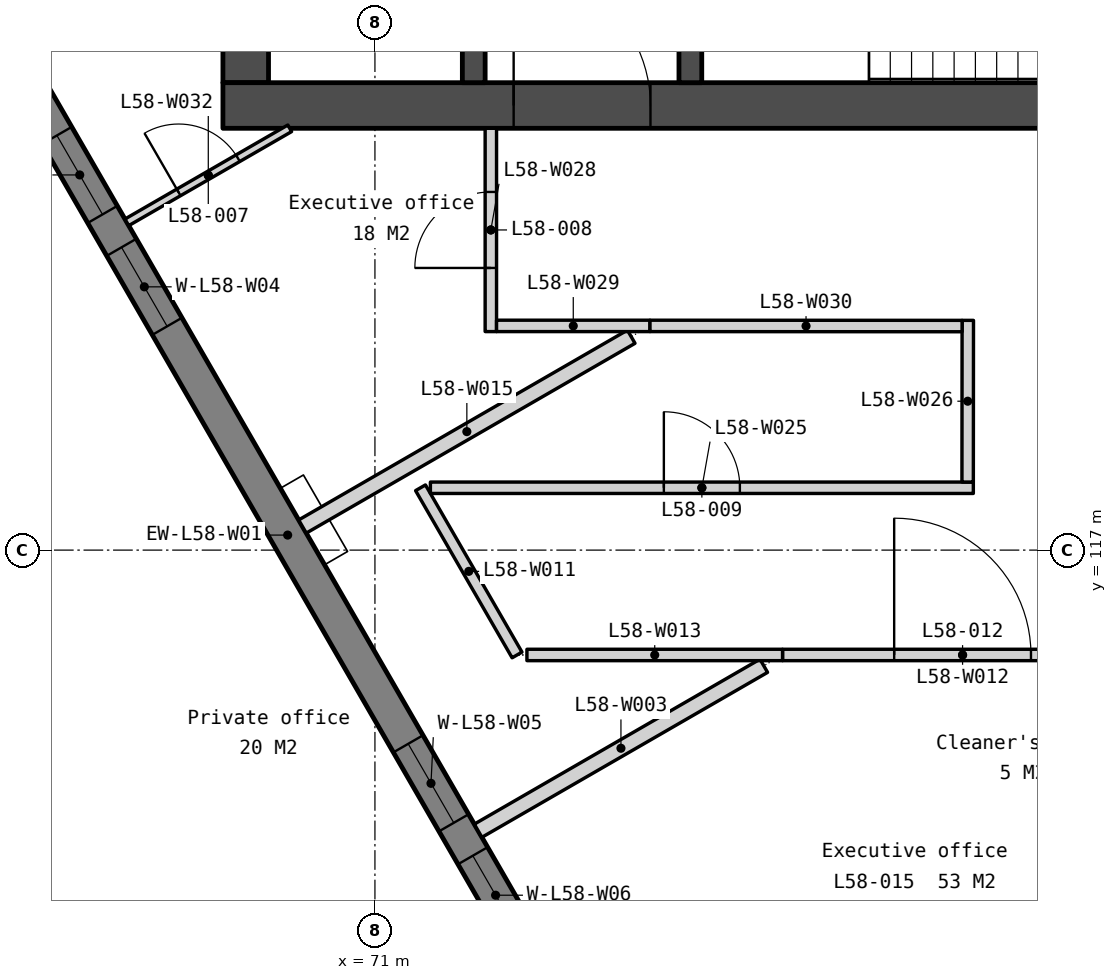
"""IFC4 building model, lengths in metres.
Left out: names, types, materials, properties, quantities, classifications, styles, units other than length and angle.
Written with IfcOpenShell. Run it as: python <this file> out.ifc"""

import sys

from ifc_helpers import new_model, si_unit, direction, frame, frame_2d, origin, place, context, subcontext, project, spatial, polyline, rectangle, outline, extrude, element, fill, save


model = new_model("IFC4")
c1 = context("Model", 3, precision=1e-05, world=origin(), true_north=direction((0.0, 1.0)))
c2 = subcontext(c1, "Body", "Model", "MODEL_VIEW")
j1 = project(units=[si_unit("LENGTHUNIT", "METRE"), si_unit("PLANEANGLEUNIT", "RADIAN")], contexts=[c1])
p1 = place(None, origin())
s1 = spatial("IfcSite", under=j1, at=p1, CompositionType="ELEMENT")
p2 = place(p1, origin())
s2 = spatial("IfcBuilding", under=s1, at=p2, CompositionType="ELEMENT")
p3 = place(p2, frame((0.0, 0.0, 238.7)))
s3 = spatial("IfcBuildingStorey", under=s2, at=p3, CompositionType="ELEMENT", Elevation=238.7)
p4 = place(p3, frame((69.3, 133.95, 0.0), z_axis=(0.0, 0.0, 1.0), x_axis=(0.0, -1.0, 0.0)))
e1 = element("IfcWall", 1, at=p4, inside=s3, PredefinedType="SOLIDWALL", context=c2, shape_type="SweptSolid", body=[
    extrude(rectangle(XDim=10.8, YDim=0.6, at=frame_2d((5.4, 0.0))), origin(), (0.0, 0.0, 1.0), 3.75),
])
p5 = place(p3, frame((69.0, 122.85, 0.0), z_axis=(0.0, 0.0, 1.0), x_axis=(1.0, 0.0, 0.0)))
e2 = element("IfcWall", 2, at=p5, inside=s3, PredefinedType="SOLIDWALL", context=c2, shape_type="SweptSolid", body=[
    extrude(rectangle(XDim=22.0, YDim=0.6, at=frame_2d((11.0, 0.0))), origin(), (0.0, 0.0, 1.0), 3.75),
])
p6 = place(p5, frame((16.375, 0.0, 0.0)))
e3 = element("IfcOpeningElement", 3, at=p6, cuts=e2, PredefinedType="OPENING", context=c2, shape_type="SweptSolid", body=[
    extrude(rectangle(XDim=1.8, YDim=2.1, at=frame_2d((0.9, 1.05))), frame((0.0, 0.31, 0.0), z_axis=(0.0, -1.0, 0.0), x_axis=(1.0, 0.0, 0.0)), (0.0, 0.0, 1.0), 0.62),
])
p7 = place(p5, frame((3.825, 0.0, 0.0)))
e4 = element("IfcOpeningElement", 4, at=p7, cuts=e2, PredefinedType="OPENING", context=c2, shape_type="SweptSolid", body=[
    extrude(rectangle(XDim=1.8, YDim=2.1, at=frame_2d((0.9, 1.05))), frame((0.0, 0.31, 0.0), z_axis=(0.0, -1.0, 0.0), x_axis=(1.0, 0.0, 0.0)), (0.0, 0.0, 1.0), 0.62),
])
p8 = place(p5, frame((12.85, 0.0, 0.0)))
e5 = element("IfcOpeningElement", 5, at=p8, cuts=e2, PredefinedType="OPENING", context=c2, shape_type="SweptSolid", body=[
    extrude(rectangle(XDim=1.5, YDim=2.1, at=frame_2d((0.75, 1.05))), frame((0.0, 0.31, 0.0), z_axis=(0.0, -1.0, 0.0), x_axis=(1.0, 0.0, 0.0)), (0.0, 0.0, 1.0), 0.62),
])
p9 = place(p3, frame((72.3, 133.95, 0.0), z_axis=(0.0, 0.0, 1.0), x_axis=(0.0, -1.0, 0.0)))
e6 = element("IfcWall", 6, at=p9, inside=s3, PredefinedType="SOLIDWALL", context=c2, shape_type="SweptSolid", body=[
    extrude(rectangle(XDim=10.8, YDim=0.3, at=frame_2d((5.4, 0.0))), origin(), (0.0, 0.0, 1.0), 3.75),
])
p10 = place(p9, frame((6.95, 0.0, 0.0)))
e7 = element("IfcOpeningElement", 7, at=p10, cuts=e6, PredefinedType="OPENING", context=c2, shape_type="SweptSolid", body=[
    extrude(rectangle(XDim=1.1, YDim=2.1, at=frame_2d((0.55, 1.05))), frame((0.0, 0.16, 0.0), z_axis=(0.0, -1.0, 0.0), x_axis=(1.0, 0.0, 0.0)), (0.0, 0.0, 1.0), 0.32),
])
p11 = place(p9, frame((9.35, 0.0, 0.0)))
e8 = element("IfcOpeningElement", 8, at=p11, cuts=e6, PredefinedType="OPENING", context=c2, shape_type="SweptSolid", body=[
    extrude(rectangle(XDim=0.9, YDim=2.1, at=frame_2d((0.45, 1.05))), frame((0.0, 0.16, 0.0), z_axis=(0.0, -1.0, 0.0), x_axis=(1.0, 0.0, 0.0)), (0.0, 0.0, 1.0), 0.32),
])
p12 = place(p9, frame((5.1, 0.0, 0.0)))
e9 = element("IfcOpeningElement", 9, at=p12, cuts=e6, PredefinedType="OPENING", context=c2, shape_type="SweptSolid", body=[
    extrude(rectangle(XDim=1.0, YDim=2.1, at=frame_2d((0.5, 1.05))), frame((0.0, 0.16, 0.0), z_axis=(0.0, -1.0, 0.0), x_axis=(1.0, 0.0, 0.0)), (0.0, 0.0, 1.0), 0.32),
])
p13 = place(p3, frame((75.15, 125.7, 0.0), z_axis=(0.0, 0.0, 1.0), x_axis=(0.0, -1.0, 0.0)))
e10 = element("IfcWall", 10, at=p13, inside=s3, PredefinedType="SOLIDWALL", context=c2, shape_type="SweptSolid", body=[
    extrude(rectangle(XDim=2.55, YDim=0.3, at=frame_2d((1.275, 0.0))), origin(), (0.0, 0.0, 1.0), 3.75),
])
p14 = place(p3, frame((60.609, 133.207, -0.45), z_axis=(0.0, 0.0, 1.0), x_axis=(0.500002536638, -0.866023939251, 0.0)))
e11 = element("IfcWall", 11, at=p14, inside=s3, PredefinedType="SOLIDWALL", context=c2, shape_type="SweptSolid", body=[
    extrude(outline(polyline([(36.972, 0.0), (36.972, 4.2), (0.0, 4.2), (0.0, 0.0), (36.972, 0.0)])), frame((0.0, 0.225, 0.0), z_axis=(0.0, -1.0, 0.0), x_axis=(1.0, 0.0, 0.0)), (0.0, 0.0, 1.0), 0.45),
])
p15 = place(p14, frame((3.172, 0.0, 1.25)))
e12 = element("IfcOpeningElement", 12, at=p15, cuts=e11, PredefinedType="OPENING", context=c2, shape_type="SweptSolid", body=[
    extrude(rectangle(XDim=1.2, YDim=2.2, at=frame_2d((0.6, 1.1))), frame((0.0, 0.235, 0.0), z_axis=(0.0, -1.0, 0.0), x_axis=(1.0, 0.0, 0.0)), (0.0, 0.0, 1.0), 0.47),
])
p16 = place(p14, frame((4.872, 0.0, 1.25)))
e13 = element("IfcOpeningElement", 13, at=p16, cuts=e11, PredefinedType="OPENING", context=c2, shape_type="SweptSolid", body=[
    extrude(rectangle(XDim=1.2, YDim=2.2, at=frame_2d((0.6, 1.1))), frame((0.0, 0.235, 0.0), z_axis=(0.0, -1.0, 0.0), x_axis=(1.0, 0.0, 0.0)), (0.0, 0.0, 1.0), 0.47),
])
p17 = place(p14, frame((12.415, 0.0, 1.25)))
e14 = element("IfcOpeningElement", 14, at=p17, cuts=e11, PredefinedType="OPENING", context=c2, shape_type="SweptSolid", body=[
    extrude(rectangle(XDim=1.2, YDim=2.2, at=frame_2d((0.6, 1.1))), frame((0.0, 0.235, 0.0), z_axis=(0.0, -1.0, 0.0), x_axis=(1.0, 0.0, 0.0)), (0.0, 0.0, 1.0), 0.47),
])
p18 = place(p14, frame((14.115, 0.0, 1.25)))
e15 = element("IfcOpeningElement", 15, at=p18, cuts=e11, PredefinedType="OPENING", context=c2, shape_type="SweptSolid", body=[
    extrude(rectangle(XDim=1.2, YDim=2.2, at=frame_2d((0.6, 1.1))), frame((0.0, 0.235, 0.0), z_axis=(0.0, -1.0, 0.0), x_axis=(1.0, 0.0, 0.0)), (0.0, 0.0, 1.0), 0.47),
])
p19 = place(p14, frame((21.658, 0.0, 1.25)))
e16 = element("IfcOpeningElement", 16, at=p19, cuts=e11, PredefinedType="OPENING", context=c2, shape_type="SweptSolid", body=[
    extrude(rectangle(XDim=1.2, YDim=2.2, at=frame_2d((0.6, 1.1))), frame((0.0, 0.235, 0.0), z_axis=(0.0, -1.0, 0.0), x_axis=(1.0, 0.0, 0.0)), (0.0, 0.0, 1.0), 0.47),
])
p20 = place(p14, frame((23.358, 0.0, 1.25)))
e17 = element("IfcOpeningElement", 17, at=p20, cuts=e11, PredefinedType="OPENING", context=c2, shape_type="SweptSolid", body=[
    extrude(rectangle(XDim=1.2, YDim=2.2, at=frame_2d((0.6, 1.1))), frame((0.0, 0.235, 0.0), z_axis=(0.0, -1.0, 0.0), x_axis=(1.0, 0.0, 0.0)), (0.0, 0.0, 1.0), 0.47),
])
p21 = place(p14, frame((30.901, 0.0, 1.25)))
e18 = element("IfcOpeningElement", 18, at=p21, cuts=e11, PredefinedType="OPENING", context=c2, shape_type="SweptSolid", body=[
    extrude(rectangle(XDim=1.2, YDim=2.2, at=frame_2d((0.6, 1.1))), frame((0.0, 0.235, 0.0), z_axis=(0.0, -1.0, 0.0), x_axis=(1.0, 0.0, 0.0)), (0.0, 0.0, 1.0), 0.47),
])
p22 = place(p14, frame((32.601, 0.0, 1.25)))
e19 = element("IfcOpeningElement", 19, at=p22, cuts=e11, PredefinedType="OPENING", context=c2, shape_type="SweptSolid", body=[
    extrude(rectangle(XDim=1.2, YDim=2.2, at=frame_2d((0.6, 1.1))), frame((0.0, 0.235, 0.0), z_axis=(0.0, -1.0, 0.0), x_axis=(1.0, 0.0, 0.0)), (0.0, 0.0, 1.0), 0.47),
])
p23 = place(p3, frame((72.357, 113.308, 0.0), z_axis=(0.0, 0.0, 1.0), x_axis=(0.866032891431, 0.499987030792, 0.0)))
e20 = element("IfcWall", 20, at=p23, inside=s3, PredefinedType="PARTITIONING", context=c2, shape_type="SweptSolid", body=[
    extrude(rectangle(XDim=4.34, YDim=0.2, at=frame_2d((2.17, 0.0))), origin(), (0.0, 0.0, 1.0), 3.75),
])
p24 = place(p3, frame((71.6, 117.82, 0.0), z_axis=(0.0, 0.0, 1.0), x_axis=(0.500035802948, -0.866004731956, 0.0)))
e21 = element("IfcWall", 21, at=p24, inside=s3, PredefinedType="PARTITIONING", context=c2, shape_type="SweptSolid", body=[
    extrude(rectangle(XDim=2.54, YDim=0.15, at=frame_2d((1.27, 0.0))), origin(), (0.0, 0.0, 1.0), 3.75),
])
p25 = place(p3, frame((76.363, 115.62, 0.0), z_axis=(0.0, 0.0, 1.0), x_axis=(1.0, 0.0, 0.0)))
e22 = element("IfcWall", 22, at=p25, inside=s3, PredefinedType="PARTITIONING", context=c2, shape_type="SweptSolid", body=[
    extrude(rectangle(XDim=4.737, YDim=0.15, at=frame_2d((2.369, 0.0))), origin(), (0.0, 0.0, 1.0), 3.75),
])
p26 = place(p25, frame((1.469, 0.0, 0.0)))
e23 = element("IfcOpeningElement", 23, at=p26, cuts=e22, PredefinedType="OPENING", context=c2, shape_type="SweptSolid", body=[
    extrude(rectangle(XDim=1.8, YDim=2.1, at=frame_2d((0.9, 1.05))), frame((0.0, 0.085, 0.0), z_axis=(0.0, -1.0, 0.0), x_axis=(1.0, 0.0, 0.0)), (0.0, 0.0, 1.0), 0.17),
])
p27 = place(p3, frame((73.0, 115.62, 0.0), z_axis=(0.0, 0.0, 1.0), x_axis=(1.0, 0.0, 0.0)))
e24 = element("IfcWall", 24, at=p27, inside=s3, PredefinedType="PARTITIONING", context=c2, shape_type="SweptSolid", body=[
    extrude(rectangle(XDim=3.363, YDim=0.15, at=frame_2d((1.682, 0.0))), origin(), (0.0, 0.0, 1.0), 3.75),
])
p28 = place(p3, frame((70.047, 117.31, 0.0), z_axis=(0.0, 0.0, 1.0), x_axis=(0.866032544947, 0.499987630939, 0.0)))
e25 = element("IfcWall", 25, at=p28, inside=s3, PredefinedType="PARTITIONING", context=c2, shape_type="SweptSolid", body=[
    extrude(rectangle(XDim=4.994, YDim=0.2, at=frame_2d((2.497, 0.0))), origin(), (0.0, 0.0, 1.0), 3.75),
])
p29 = place(p3, frame((71.729, 117.82, 0.0), z_axis=(0.0, 0.0, 1.0), x_axis=(1.0, 0.0, 0.0)))
e26 = element("IfcWall", 26, at=p29, inside=s3, PredefinedType="PARTITIONING", context=c2, shape_type="SweptSolid", body=[
    extrude(rectangle(XDim=7.144, YDim=0.15, at=frame_2d((3.572, 0.0))), origin(), (0.0, 0.0, 1.0), 3.75),
])
p30 = place(p29, frame((3.072, 0.0, 0.0)))
e27 = element("IfcOpeningElement", 27, at=p30, cuts=e26, PredefinedType="OPENING", context=c2, shape_type="SweptSolid", body=[
    extrude(rectangle(XDim=1.0, YDim=2.1, at=frame_2d((0.5, 1.05))), frame((0.0, 0.085, 0.0), z_axis=(0.0, -1.0, 0.0), x_axis=(1.0, 0.0, 0.0)), (0.0, 0.0, 1.0), 0.17),
])
p31 = place(p3, frame((78.798, 117.895, 0.0), z_axis=(0.0, 0.0, 1.0), x_axis=(0.000917957158, 0.999999578677, 0.0)))
e28 = element("IfcWall", 28, at=p31, inside=s3, PredefinedType="PARTITIONING", context=c2, shape_type="SweptSolid", body=[
    extrude(rectangle(XDim=2.128, YDim=0.15, at=frame_2d((1.064, 0.0))), origin(), (0.0, 0.0, 1.0), 3.75),
])
p32 = place(p3, frame((72.525, 119.875, 0.0), z_axis=(0.0, 0.0, 1.0), x_axis=(0.0, 1.0, 0.0)))
e29 = element("IfcWall", 29, at=p32, inside=s3, PredefinedType="PARTITIONING", context=c2, shape_type="SweptSolid", body=[
    extrude(rectangle(XDim=2.675, YDim=0.15, at=frame_2d((1.337, 0.0))), origin(), (0.0, 0.0, 1.0), 3.75),
])
p33 = place(p32, frame((0.837, 0.0, 0.0)))
e30 = element("IfcOpeningElement", 30, at=p33, cuts=e29, PredefinedType="OPENING", context=c2, shape_type="SweptSolid", body=[
    extrude(rectangle(XDim=1.0, YDim=2.1, at=frame_2d((0.5, 1.05))), frame((0.0, 0.085, 0.0), z_axis=(0.0, -1.0, 0.0), x_axis=(1.0, 0.0, 0.0)), (0.0, 0.0, 1.0), 0.17),
])
p34 = place(p3, frame((72.6, 119.95, 0.0), z_axis=(0.0, 0.0, 1.0), x_axis=(1.0, 0.0, 0.0)))
e31 = element("IfcWall", 31, at=p34, inside=s3, PredefinedType="PARTITIONING", context=c2, shape_type="SweptSolid", body=[
    extrude(rectangle(XDim=2.019, YDim=0.15, at=frame_2d((1.009, 0.0))), origin(), (0.0, 0.0, 1.0), 3.75),
])
p35 = place(p3, frame((74.619, 119.95, 0.0), z_axis=(0.0, 0.0, 1.0), x_axis=(0.999999886891, -0.000475624203, 0.0)))
e32 = element("IfcWall", 32, at=p35, inside=s3, PredefinedType="PARTITIONING", context=c2, shape_type="SweptSolid", body=[
    extrude(rectangle(XDim=4.106, YDim=0.15, at=frame_2d((2.053, 0.0))), origin(), (0.0, 0.0, 1.0), 3.75),
])
p36 = place(p3, frame((67.736, 121.313, 0.0), z_axis=(0.0, 0.0, 1.0), x_axis=(0.866024577697, 0.500001430823, 0.0)))
e33 = element("IfcWall", 33, at=p36, inside=s3, PredefinedType="PARTITIONING", context=c2, shape_type="SweptSolid", body=[
    extrude(rectangle(XDim=2.475, YDim=0.1, at=frame_2d((1.237, 0.0))), origin(), (0.0, 0.0, 1.0), 3.75),
])
p37 = place(p36, frame((0.787, 0.0, 0.0)))
e34 = element("IfcOpeningElement", 34, at=p37, cuts=e33, PredefinedType="OPENING", context=c2, shape_type="SweptSolid", body=[
    extrude(rectangle(XDim=0.9, YDim=2.1, at=frame_2d((0.45, 1.05))), frame((0.0, 0.06, 0.0), z_axis=(0.0, -1.0, 0.0), x_axis=(1.0, 0.0, 0.0)), (0.0, 0.0, 1.0), 0.12),
])
p38 = place(p7, origin())
e35 = element("IfcDoor", 35, at=p38, inside=s3, OperationType="DOUBLE_DOOR_DOUBLE_SWING", PredefinedType="DOOR", context=c2, shape_type="SweptSolid", body=[
    extrude(rectangle(XDim=1.8, YDim=2.1, at=frame_2d((0.9, 1.05))), frame((0.0, 0.025, 0.0), z_axis=(0.0, -1.0, 0.0), x_axis=(1.0, 0.0, 0.0)), (0.0, 0.0, 1.0), 0.05),
])
fill(e4, e35)
p39 = place(p17, origin())
e36 = element("IfcWindow", 36, at=p39, inside=s3, PartitioningType="SINGLE_PANEL", PredefinedType="WINDOW", context=c2, shape_type="SweptSolid", body=[
    extrude(rectangle(XDim=1.2, YDim=2.2, at=frame_2d((0.6, 1.1))), frame((0.0, 0.03, 0.0), z_axis=(0.0, -1.0, 0.0), x_axis=(1.0, 0.0, 0.0)), (0.0, 0.0, 1.0), 0.06),
])
fill(e14, e36)
p40 = place(p18, origin())
e37 = element("IfcWindow", 37, at=p40, inside=s3, PartitioningType="SINGLE_PANEL", PredefinedType="WINDOW", context=c2, shape_type="SweptSolid", body=[
    extrude(rectangle(XDim=1.2, YDim=2.2, at=frame_2d((0.6, 1.1))), frame((0.0, 0.03, 0.0), z_axis=(0.0, -1.0, 0.0), x_axis=(1.0, 0.0, 0.0)), (0.0, 0.0, 1.0), 0.06),
])
fill(e15, e37)
p41 = place(p19, origin())
e38 = element("IfcWindow", 38, at=p41, inside=s3, PartitioningType="SINGLE_PANEL", PredefinedType="WINDOW", context=c2, shape_type="SweptSolid", body=[
    extrude(rectangle(XDim=1.2, YDim=2.2, at=frame_2d((0.6, 1.1))), frame((0.0, 0.03, 0.0), z_axis=(0.0, -1.0, 0.0), x_axis=(1.0, 0.0, 0.0)), (0.0, 0.0, 1.0), 0.06),
])
fill(e16, e38)
p42 = place(p20, origin())
e39 = element("IfcWindow", 39, at=p42, inside=s3, PartitioningType="SINGLE_PANEL", PredefinedType="WINDOW", context=c2, shape_type="SweptSolid", body=[
    extrude(rectangle(XDim=1.2, YDim=2.2, at=frame_2d((0.6, 1.1))), frame((0.0, 0.03, 0.0), z_axis=(0.0, -1.0, 0.0), x_axis=(1.0, 0.0, 0.0)), (0.0, 0.0, 1.0), 0.06),
])
fill(e17, e39)
p43 = place(p37, origin())
e40 = element("IfcDoor", 40, at=p43, inside=s3, OperationType="SINGLE_SWING_LEFT", PredefinedType="DOOR", context=c2, shape_type="SweptSolid", body=[
    extrude(rectangle(XDim=0.9, YDim=2.1, at=frame_2d((0.45, 1.05))), frame((0.0, 0.025, 0.0), z_axis=(0.0, -1.0, 0.0), x_axis=(1.0, 0.0, 0.0)), (0.0, 0.0, 1.0), 0.05),
])
fill(e34, e40)
p44 = place(p33, origin())
e41 = element("IfcDoor", 41, at=p44, inside=s3, OperationType="SINGLE_SWING_LEFT", PredefinedType="DOOR", context=c2, shape_type="SweptSolid", body=[
    extrude(rectangle(XDim=1.0, YDim=2.1, at=frame_2d((0.5, 1.05))), frame((0.0, 0.025, 0.0), z_axis=(0.0, -1.0, 0.0), x_axis=(1.0, 0.0, 0.0)), (0.0, 0.0, 1.0), 0.05),
])
fill(e30, e41)
p45 = place(p30, origin())
e42 = element("IfcDoor", 42, at=p45, inside=s3, OperationType="SINGLE_SWING_LEFT", PredefinedType="DOOR", context=c2, shape_type="SweptSolid", body=[
    extrude(rectangle(XDim=1.0, YDim=2.1, at=frame_2d((0.5, 1.05))), frame((0.0, 0.025, 0.0), z_axis=(0.0, -1.0, 0.0), x_axis=(1.0, 0.0, 0.0)), (0.0, 0.0, 1.0), 0.05),
])
fill(e27, e42)
p46 = place(p26, origin())
e43 = element("IfcDoor", 43, at=p46, inside=s3, OperationType="SINGLE_SWING_LEFT", PredefinedType="DOOR", context=c2, shape_type="SweptSolid", body=[
    extrude(rectangle(XDim=1.8, YDim=2.1, at=frame_2d((0.9, 1.05))), frame((0.0, 0.025, 0.0), z_axis=(0.0, -1.0, 0.0), x_axis=(1.0, 0.0, 0.0)), (0.0, 0.0, 1.0), 0.05),
])
fill(e23, e43)
save(model, sys.argv[1])
